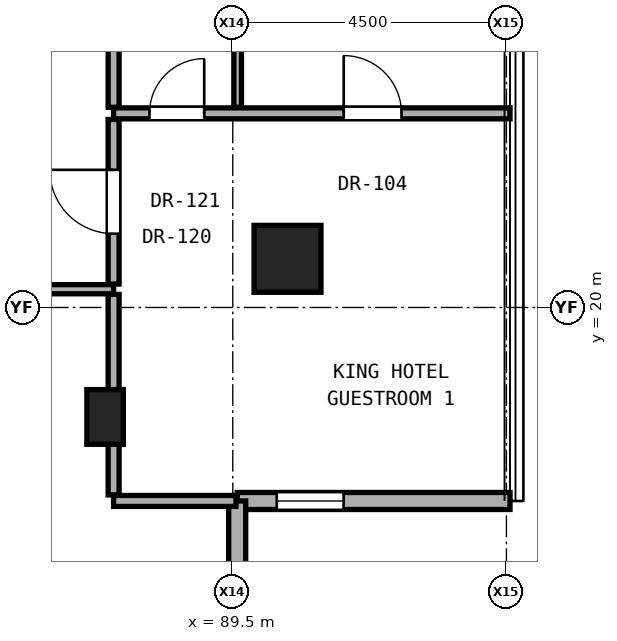
"""IFC4 building model, lengths in metres.
Left out: names, types, materials, properties, quantities, classifications, styles, units other than length and angle.
Written with IfcOpenShell. Run it as: python <this file> out.ifc"""

import sys

from ifc_helpers import new_model, si_unit, direction, frame, frame_2d, origin, origin_2d, place, context, subcontext, project, spatial, rectangle, hollow_rectangle, extrude, element, fill, save


model = new_model("IFC4")
c1 = context("Model", 3, precision=1e-05, world=origin(), true_north=direction((0.0, 1.0)))
c2 = subcontext(c1, "Body", "Model", "MODEL_VIEW")
j1 = project(units=[si_unit("LENGTHUNIT", "METRE"), si_unit("PLANEANGLEUNIT", "RADIAN")], contexts=[c1])
p1 = place(None, origin())
s1 = spatial("IfcSite", under=j1, at=p1, CompositionType="ELEMENT")
p2 = place(p1, origin())
s2 = spatial("IfcBuilding", under=s1, at=p2, CompositionType="ELEMENT")
p3 = place(p2, frame((0.0, 0.0, 128.0)))
s3 = spatial("IfcBuildingStorey", under=s2, at=p3, CompositionType="ELEMENT", Elevation=128.0)
p4 = place(p3, frame((90.4, 20.8, 0.0), z_axis=(0.0, 0.0, 1.0), x_axis=(1.0, 0.0, 0.0)))
e1 = element("IfcColumn", 1, at=p4, inside=s3, PredefinedType="COLUMN", context=c2, shape_type="SweptSolid", body=[
    extrude(hollow_rectangle(XDim=1.1, YDim=1.1, WallThickness=0.06, at=origin_2d()), origin(), (0.0, 0.0, 1.0), 3.3),
])
p5 = place(p3, frame((87.4, 18.2, 0.0), z_axis=(0.0, 0.0, 1.0), x_axis=(1.0, 0.0, 0.0)))
e2 = element("IfcColumn", 2, at=p5, inside=s3, PredefinedType="PILASTER", context=c2, shape_type="SweptSolid", body=[
    extrude(rectangle(XDim=0.6, YDim=0.9, at=origin_2d()), origin(), (0.0, 0.0, 1.0), 3.3),
])
p6 = place(p3, frame((89.573, 16.818, 0.0), z_axis=(0.0, 0.0, 1.0), x_axis=(1.0, 0.0, 0.0)))
e3 = element("IfcWall", 3, at=p6, inside=s3, PredefinedType="SOLIDWALL", context=c2, shape_type="SweptSolid", body=[
    extrude(rectangle(XDim=4.487, YDim=0.28, at=frame_2d((2.243, 0.0))), origin(), (0.0, 0.0, 1.0), 3.06),
])
p7 = place(p6, frame((0.65, 0.0, 0.85)))
e4 = element("IfcOpeningElement", 4, at=p7, cuts=e3, PredefinedType="OPENING", context=c2, shape_type="SweptSolid", body=[
    extrude(rectangle(XDim=1.1, YDim=2.0, at=frame_2d((0.55, 1.0))), frame((0.0, 0.15, 0.0), z_axis=(0.0, -1.0, 0.0), x_axis=(1.0, 0.0, 0.0)), (0.0, 0.0, 1.0), 0.3),
])
p8 = place(p3, frame((89.573, 12.331, 0.0), z_axis=(0.0, 0.0, 1.0), x_axis=(0.0, 1.0, 0.0)))
e5 = element("IfcWall", 5, at=p8, inside=s3, PredefinedType="SOLIDWALL", context=c2, shape_type="SweptSolid", body=[
    extrude(rectangle(XDim=4.487, YDim=0.28, at=frame_2d((2.243, 0.0))), origin(), (0.0, 0.0, 1.0), 3.06),
])
p9 = place(p3, frame((87.54, 16.818, 0.0), z_axis=(0.0, 0.0, 1.0), x_axis=(1.0, 0.0, 0.0)))
e6 = element("IfcWall", 6, at=p9, inside=s3, PredefinedType="PARTITIONING", context=c2, shape_type="SweptSolid", body=[
    extrude(rectangle(XDim=2.012, YDim=0.18, at=frame_2d((1.006, 0.0))), origin(), (0.0, 0.0, 1.0), 3.08),
])
p10 = place(p3, frame((86.18, 20.3, 0.0), z_axis=(0.0, 0.0, 1.0), x_axis=(1.0, 0.0, 0.0)))
e7 = element("IfcWall", 7, at=p10, inside=s3, PredefinedType="PARTITIONING", context=c2, shape_type="SweptSolid", body=[
    extrude(rectangle(XDim=1.36, YDim=0.15, at=frame_2d((0.68, 0.0))), origin(), (0.0, 0.0, 1.0), 3.08),
])
p11 = place(p3, frame((87.54, 23.192, 0.0), z_axis=(0.0, 0.0, 1.0), x_axis=(1.0, 0.0, 0.0)))
e8 = element("IfcWall", 8, at=p11, inside=s3, PredefinedType="PARTITIONING", context=c2, shape_type="SweptSolid", body=[
    extrude(rectangle(XDim=6.519, YDim=0.18, at=frame_2d((3.26, 0.0))), origin(), (0.0, 0.0, 1.0), 2.299),
])
p12 = place(p11, frame((3.784, 0.0, 0.0)))
e9 = element("IfcOpeningElement", 9, at=p12, cuts=e8, PredefinedType="OPENING", context=c2, shape_type="SweptSolid", body=[
    extrude(rectangle(XDim=0.95, YDim=2.15, at=frame_2d((0.475, 1.075))), frame((0.0, 0.1, 0.0), z_axis=(0.0, -1.0, 0.0), x_axis=(1.0, 0.0, 0.0)), (0.0, 0.0, 1.0), 0.2),
])
p13 = place(p11, frame((0.59, 0.0, 0.0)))
e10 = element("IfcOpeningElement", 10, at=p13, cuts=e8, PredefinedType="OPENING", context=c2, shape_type="SweptSolid", body=[
    extrude(rectangle(XDim=0.9, YDim=2.1, at=frame_2d((0.45, 1.05))), frame((0.0, 0.1, 0.0), z_axis=(0.0, -1.0, 0.0), x_axis=(1.0, 0.0, 0.0)), (0.0, 0.0, 1.0), 0.2),
])
p14 = place(p3, frame((87.54, 16.918, 0.0), z_axis=(0.0, 0.0, 1.0), x_axis=(0.0, 1.0, 0.0)))
e11 = element("IfcWall", 11, at=p14, inside=s3, PredefinedType="PARTITIONING", context=c2, shape_type="SweptSolid", body=[
    extrude(rectangle(XDim=3.297, YDim=0.18, at=frame_2d((1.648, 0.0))), origin(), (0.0, 0.0, 1.0), 2.523),
])
p15 = place(p3, frame((87.54, 20.385, 0.0), z_axis=(0.0, 0.0, 1.0), x_axis=(0.0, 1.0, 0.0)))
e12 = element("IfcWall", 12, at=p15, inside=s3, PredefinedType="PARTITIONING", context=c2, shape_type="SweptSolid", body=[
    extrude(rectangle(XDim=2.707, YDim=0.18, at=frame_2d((1.354, 0.0))), origin(), (0.0, 0.0, 1.0), 2.472),
])
p16 = place(p15, frame((0.829, 0.0, 0.0)))
e13 = element("IfcOpeningElement", 13, at=p16, cuts=e12, PredefinedType="OPENING", context=c2, shape_type="SweptSolid", body=[
    extrude(rectangle(XDim=1.05, YDim=2.2, at=frame_2d((0.525, 1.1))), frame((0.0, 0.1, 0.0), z_axis=(0.0, -1.0, 0.0), x_axis=(1.0, 0.0, 0.0)), (0.0, 0.0, 1.0), 0.2),
])
p17 = place(p3, frame((87.54, 23.292, 0.0), z_axis=(0.0, 0.0, 1.0), x_axis=(0.0, 1.0, 0.0)))
e14 = element("IfcWall", 14, at=p17, inside=s3, PredefinedType="PARTITIONING", context=c2, shape_type="SweptSolid", body=[
    extrude(rectangle(XDim=2.127, YDim=0.18, at=frame_2d((1.064, 0.0))), origin(), (0.0, 0.0, 1.0), 3.08),
])
p18 = place(p3, frame((89.58, 23.292, 0.0), z_axis=(0.0, 0.0, 1.0), x_axis=(0.0, 1.0, 0.0)))
e15 = element("IfcWall", 15, at=p18, inside=s3, PredefinedType="PARTITIONING", context=c2, shape_type="SweptSolid", body=[
    extrude(rectangle(XDim=2.127, YDim=0.125, at=frame_2d((1.064, 0.0))), origin(), (0.0, 0.0, 1.0), 3.08),
])
p19 = place(p7, origin())
e16 = element("IfcWindow", 16, at=p19, inside=s3, PartitioningType="SINGLE_PANEL", PredefinedType="WINDOW", context=c2, shape_type="SweptSolid", body=[
    extrude(rectangle(XDim=1.1, YDim=2.0, at=frame_2d((0.55, 1.0))), frame((0.0, 0.03, 0.0), z_axis=(0.0, -1.0, 0.0), x_axis=(1.0, 0.0, 0.0)), (0.0, 0.0, 1.0), 0.06),
])
fill(e4, e16)
p20 = place(p16, origin())
e17 = element("IfcDoor", 17, at=p20, inside=s3, OperationType="SINGLE_SWING_RIGHT", PredefinedType="DOOR", context=c2, shape_type="SweptSolid", body=[
    extrude(rectangle(XDim=1.05, YDim=2.2, at=frame_2d((0.525, 1.1))), frame((0.0, 0.025, 0.0), z_axis=(0.0, -1.0, 0.0), x_axis=(1.0, 0.0, 0.0)), (0.0, 0.0, 1.0), 0.05),
])
fill(e13, e17)
p21 = place(p12, origin())
e18 = element("IfcDoor", 18, at=p21, inside=s3, OperationType="SINGLE_SWING_LEFT", PredefinedType="DOOR", context=c2, shape_type="SweptSolid", body=[
    extrude(rectangle(XDim=0.95, YDim=2.15, at=frame_2d((0.475, 1.075))), frame((0.0, 0.025, 0.0), z_axis=(0.0, -1.0, 0.0), x_axis=(1.0, 0.0, 0.0)), (0.0, 0.0, 1.0), 0.05),
])
fill(e9, e18)
p22 = place(p13, origin())
e19 = element("IfcDoor", 19, at=p22, inside=s3, OperationType="SINGLE_SWING_RIGHT", PredefinedType="DOOR", context=c2, shape_type="SweptSolid", body=[
    extrude(rectangle(XDim=0.9, YDim=2.1, at=frame_2d((0.45, 1.05))), frame((0.0, 0.025, 0.0), z_axis=(0.0, -1.0, 0.0), x_axis=(1.0, 0.0, 0.0)), (0.0, 0.0, 1.0), 0.05),
])
fill(e10, e19)
save(model, sys.argv[1])
